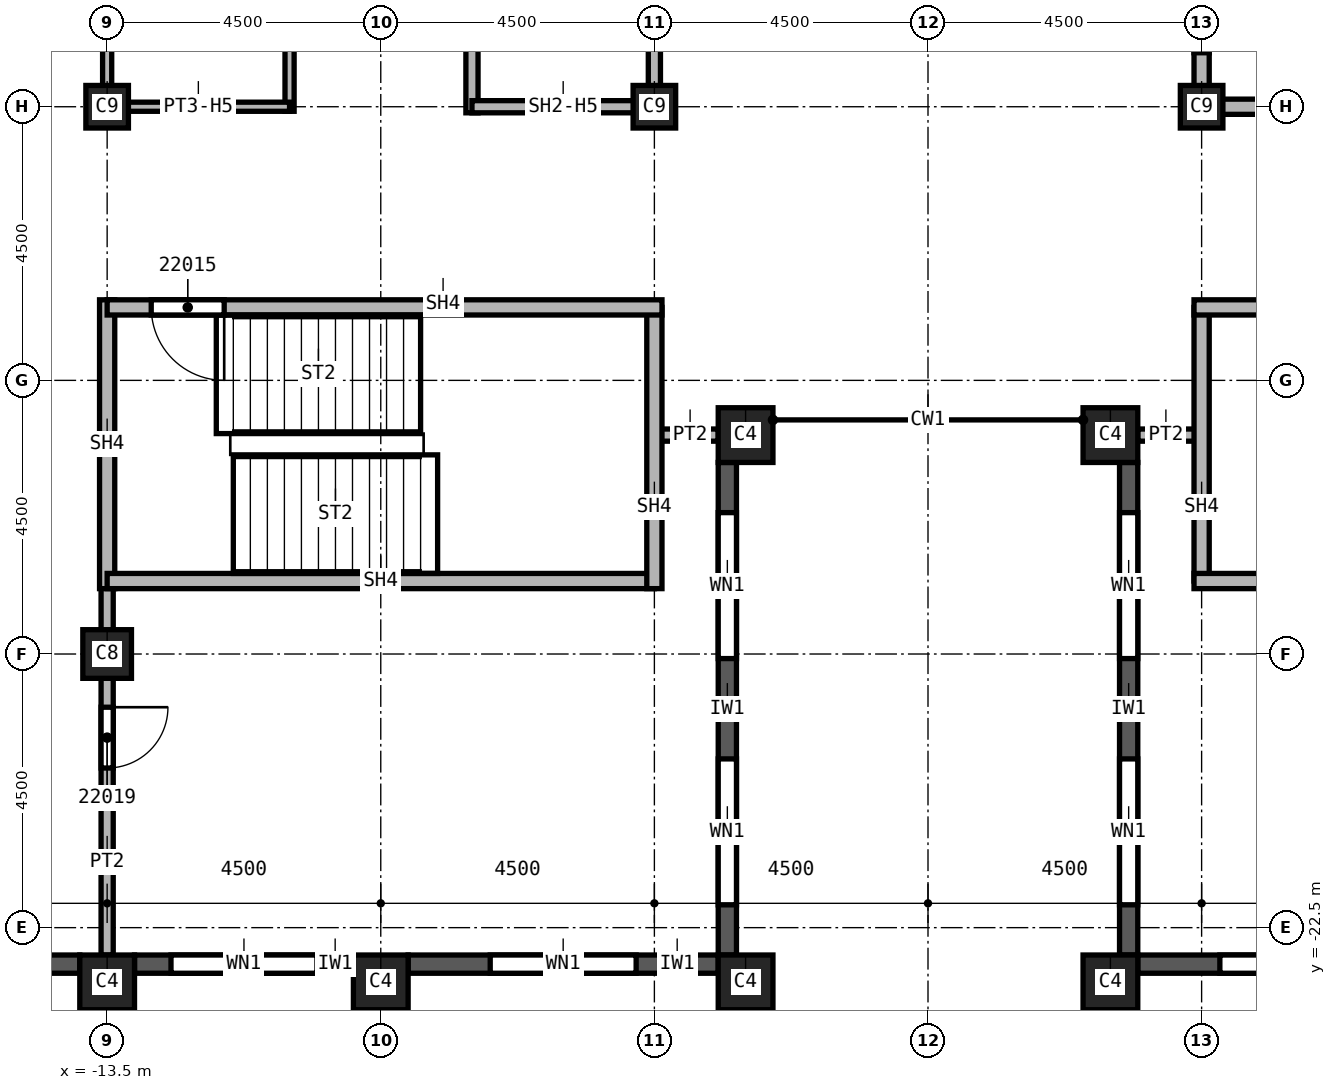
"""IFC4 building model, lengths in metres.
Left out: names, types, materials, properties, quantities, classifications, styles, units other than length and angle.
Written with IfcOpenShell. Run it as: python <this file> out.ifc"""

import sys

from ifc_helpers import new_model, si_unit, direction, frame, frame_2d, origin, origin_2d, place, context, subcontext, project, spatial, rectangle, extrude, element, fill, save


model = new_model("IFC4")
c1 = context("Model", 3, precision=1e-05, world=origin(), true_north=direction((0.0, 1.0)))
c2 = subcontext(c1, "Body", "Model", "MODEL_VIEW")
j1 = project(units=[si_unit("LENGTHUNIT", "METRE"), si_unit("PLANEANGLEUNIT", "RADIAN")], contexts=[c1])
p1 = place(None, origin())
s1 = spatial("IfcSite", under=j1, at=p1, CompositionType="ELEMENT")
p2 = place(p1, origin())
s2 = spatial("IfcBuilding", under=s1, at=p2, CompositionType="ELEMENT")
p3 = place(p2, frame((0.0, 0.0, 316.0)))
s3 = spatial("IfcBuildingStorey", under=s2, at=p3, CompositionType="ELEMENT", Elevation=316.0)
p4 = place(p3, frame((-13.5, -18.0, 0.0), z_axis=(0.0, 0.0, 1.0), x_axis=(1.0, 0.0, 0.0)))
e1 = element("IfcColumn", 1, at=p4, inside=s3, PredefinedType="COLUMN", context=c2, shape_type="SweptSolid", body=[
    extrude(rectangle(XDim=0.8, YDim=0.8, at=origin_2d()), origin(), (0.0, 0.0, 1.0), 3.59),
])
for number, where, z_axis, x_axis in (
    (2, (4.5, -9.0, 0.0), (0.0, 0.0, 1.0), (1.0, 0.0, 0.0)),
    (3, (-4.5, -9.0, 0.0), (0.0, 0.0, 1.0), (1.0, 0.0, 0.0)),
    (4, (-13.5, -9.0, 0.0), (0.0, 0.0, 1.0), (1.0, 0.0, 0.0)),
):
    element("IfcColumn", number, at=place(p3, frame(where, z_axis=z_axis, x_axis=x_axis)), inside=s3, PredefinedType="COLUMN", context=c2, shape_type="SweptSolid", body=[
        extrude(rectangle(XDim=0.7, YDim=0.7, at=origin_2d()), origin(), (0.0, 0.0, 1.0), 3.59),
    ])
for number, where, z_axis, x_axis in (
    (5, (3.0, -23.4, 0.0), (0.0, 0.0, 1.0), (1.0, 0.0, 0.0)),
    (6, (-3.0, -23.4, 0.0), (0.0, 0.0, 1.0), (1.0, 0.0, 0.0)),
    (7, (-9.0, -23.4, 0.0), (0.0, 0.0, 1.0), (1.0, 0.0, 0.0)),
    (8, (-13.5, -23.4, 0.0), (0.0, 0.0, 1.0), (1.0, 0.0, 0.0)),
    (9, (3.0, -14.4, 0.0), (0.0, 0.0, 1.0), (1.0, 0.0, 0.0)),
    (10, (-3.0, -14.4, 0.0), (0.0, 0.0, 1.0), (1.0, 0.0, 0.0)),
):
    element("IfcColumn", number, at=place(p3, frame(where, z_axis=z_axis, x_axis=x_axis)), inside=s3, PredefinedType="COLUMN", context=c2, shape_type="SweptSolid", body=[
        extrude(rectangle(XDim=0.9, YDim=0.9, at=origin_2d()), origin(), (0.0, 0.0, 1.0), 3.59),
    ])
p5 = place(p3, frame((-17.55, -23.1, 0.0), z_axis=(0.0, 0.0, 1.0), x_axis=(1.0, 0.0, 0.0)))
e11 = element("IfcWall", 11, at=p5, inside=s3, PredefinedType="SOLIDWALL", context=c2, shape_type="SweptSolid", body=[
    extrude(rectangle(XDim=3.6, YDim=0.3, at=frame_2d((1.8, 0.0))), origin(), (0.0, 0.0, 1.0), 2.99),
])
p6 = place(p5, frame((0.775, 0.0, 0.8)))
e12 = element("IfcOpeningElement", 12, at=p6, cuts=e11, PredefinedType="OPENING", context=c2, shape_type="SweptSolid", body=[
    extrude(rectangle(XDim=1.0, YDim=1.95, at=frame_2d((0.5, 0.975))), frame((0.0, 0.15, 0.0), z_axis=(0.0, -1.0, 0.0), x_axis=(1.0, 0.0, 0.0)), (0.0, 0.0, 1.0), 0.3),
])
p7 = place(p5, frame((2.375, 0.0, 0.8)))
e13 = element("IfcOpeningElement", 13, at=p7, cuts=e11, PredefinedType="OPENING", context=c2, shape_type="SweptSolid", body=[
    extrude(rectangle(XDim=0.6, YDim=1.95, at=frame_2d((0.3, 0.975))), frame((0.0, 0.15, 0.0), z_axis=(0.0, -1.0, 0.0), x_axis=(1.0, 0.0, 0.0)), (0.0, 0.0, 1.0), 0.3),
])
p8 = place(p3, frame((-13.05, -23.1, 0.0), z_axis=(0.0, 0.0, 1.0), x_axis=(1.0, 0.0, 0.0)))
e14 = element("IfcWall", 14, at=p8, inside=s3, PredefinedType="SOLIDWALL", context=c2, shape_type="SweptSolid", body=[
    extrude(rectangle(XDim=3.6, YDim=0.3, at=frame_2d((1.8, 0.0))), origin(), (0.0, 0.0, 1.0), 2.99),
])
p9 = place(p8, frame((0.6, 0.0, 0.8)))
e15 = element("IfcOpeningElement", 15, at=p9, cuts=e14, PredefinedType="OPENING", context=c2, shape_type="SweptSolid", body=[
    extrude(rectangle(XDim=2.4, YDim=1.95, at=frame_2d((1.2, 0.975))), frame((0.0, 0.15, 0.0), z_axis=(0.0, -1.0, 0.0), x_axis=(1.0, 0.0, 0.0)), (0.0, 0.0, 1.0), 0.3),
])
p10 = place(p3, frame((-8.55, -23.1, 0.0), z_axis=(0.0, 0.0, 1.0), x_axis=(1.0, 0.0, 0.0)))
e16 = element("IfcWall", 16, at=p10, inside=s3, PredefinedType="SOLIDWALL", context=c2, shape_type="SweptSolid", body=[
    extrude(rectangle(XDim=5.1, YDim=0.3, at=frame_2d((2.55, 0.0))), origin(), (0.0, 0.0, 1.0), 2.99),
])
p11 = place(p10, frame((1.35, 0.0, 0.8)))
e17 = element("IfcOpeningElement", 17, at=p11, cuts=e16, PredefinedType="OPENING", context=c2, shape_type="SweptSolid", body=[
    extrude(rectangle(XDim=2.4, YDim=1.95, at=frame_2d((1.2, 0.975))), frame((0.0, 0.15, 0.0), z_axis=(0.0, -1.0, 0.0), x_axis=(1.0, 0.0, 0.0)), (0.0, 0.0, 1.0), 0.3),
])
p12 = place(p3, frame((-3.3, -22.95, 0.0), z_axis=(0.0, 0.0, 1.0), x_axis=(0.0, 1.0, 0.0)))
e18 = element("IfcWall", 18, at=p12, inside=s3, PredefinedType="SOLIDWALL", context=c2, shape_type="SweptSolid", body=[
    extrude(rectangle(XDim=8.1, YDim=0.3, at=frame_2d((4.05, 0.0))), origin(), (0.0, 0.0, 1.0), 2.99),
])
p13 = place(p12, frame((0.825, 0.0, 0.8)))
e19 = element("IfcOpeningElement", 19, at=p13, cuts=e18, PredefinedType="OPENING", context=c2, shape_type="SweptSolid", body=[
    extrude(rectangle(XDim=2.4, YDim=1.95, at=frame_2d((1.2, 0.975))), frame((0.0, 0.15, 0.0), z_axis=(0.0, -1.0, 0.0), x_axis=(1.0, 0.0, 0.0)), (0.0, 0.0, 1.0), 0.3),
])
p14 = place(p12, frame((4.875, 0.0, 0.8)))
e20 = element("IfcOpeningElement", 20, at=p14, cuts=e18, PredefinedType="OPENING", context=c2, shape_type="SweptSolid", body=[
    extrude(rectangle(XDim=2.4, YDim=1.95, at=frame_2d((1.2, 0.975))), frame((0.0, 0.15, 0.0), z_axis=(0.0, -1.0, 0.0), x_axis=(1.0, 0.0, 0.0)), (0.0, 0.0, 1.0), 0.3),
])
p15 = place(p3, frame((3.3, -14.85, 0.0), z_axis=(0.0, 0.0, 1.0), x_axis=(0.0, -1.0, 0.0)))
e21 = element("IfcWall", 21, at=p15, inside=s3, PredefinedType="SOLIDWALL", context=c2, shape_type="SweptSolid", body=[
    extrude(rectangle(XDim=8.1, YDim=0.3, at=frame_2d((4.05, 0.0))), origin(), (0.0, 0.0, 1.0), 2.99),
])
p16 = place(p15, frame((0.825, 0.0, 0.8)))
e22 = element("IfcOpeningElement", 22, at=p16, cuts=e21, PredefinedType="OPENING", context=c2, shape_type="SweptSolid", body=[
    extrude(rectangle(XDim=2.4, YDim=1.95, at=frame_2d((1.2, 0.975))), frame((0.0, 0.15, 0.0), z_axis=(0.0, -1.0, 0.0), x_axis=(1.0, 0.0, 0.0)), (0.0, 0.0, 1.0), 0.3),
])
p17 = place(p15, frame((4.875, 0.0, 0.8)))
e23 = element("IfcOpeningElement", 23, at=p17, cuts=e21, PredefinedType="OPENING", context=c2, shape_type="SweptSolid", body=[
    extrude(rectangle(XDim=2.4, YDim=1.95, at=frame_2d((1.2, 0.975))), frame((0.0, 0.15, 0.0), z_axis=(0.0, -1.0, 0.0), x_axis=(1.0, 0.0, 0.0)), (0.0, 0.0, 1.0), 0.3),
])
p18 = place(p3, frame((3.45, -23.1, 0.0), z_axis=(0.0, 0.0, 1.0), x_axis=(1.0, 0.0, 0.0)))
e24 = element("IfcWall", 24, at=p18, inside=s3, PredefinedType="SOLIDWALL", context=c2, shape_type="SweptSolid", body=[
    extrude(rectangle(XDim=5.1, YDim=0.3, at=frame_2d((2.55, 0.0))), origin(), (0.0, 0.0, 1.0), 2.99),
])
p19 = place(p18, frame((1.35, 0.0, 0.8)))
e25 = element("IfcOpeningElement", 25, at=p19, cuts=e24, PredefinedType="OPENING", context=c2, shape_type="SweptSolid", body=[
    extrude(rectangle(XDim=2.4, YDim=1.95, at=frame_2d((1.2, 0.975))), frame((0.0, 0.15, 0.0), z_axis=(0.0, -1.0, 0.0), x_axis=(1.0, 0.0, 0.0)), (0.0, 0.0, 1.0), 0.3),
])
p20 = place(p3, frame((-13.5, -16.675, 0.0), z_axis=(0.0, 0.0, 1.0), x_axis=(0.0, -1.0, 0.0)))
e26 = element("IfcWall", 26, at=p20, inside=s3, PredefinedType="PARTITIONING", context=c2, shape_type="SweptSolid", body=[
    extrude(rectangle(XDim=6.275, YDim=0.2, at=frame_2d((3.137, 0.0))), origin(), (0.0, 0.0, 1.0), 3.59),
])
p21 = place(p20, frame((2.2, 0.0, 0.0)))
e27 = element("IfcOpeningElement", 27, at=p21, cuts=e26, PredefinedType="OPENING", context=c2, shape_type="SweptSolid", body=[
    extrude(rectangle(XDim=1.0, YDim=2.1, at=frame_2d((0.5, 1.05))), frame((0.0, 0.1, 0.0), z_axis=(0.0, -1.0, 0.0), x_axis=(1.0, 0.0, 0.0)), (0.0, 0.0, 1.0), 0.2),
])
for number, where, z_axis, x_axis in (
    (28, (-3.45, -14.4, 0.0), (0.0, 0.0, 1.0), (-1.0, 0.0, 0.0)),
    (29, (4.5, -14.4, 0.0), (0.0, 0.0, 1.0), (-1.0, 0.0, 0.0)),
):
    element("IfcWall", number, at=place(p3, frame(where, z_axis=z_axis, x_axis=x_axis)), inside=s3, PredefinedType="PARTITIONING", context=c2, shape_type="SweptSolid", body=[
        extrude(rectangle(XDim=1.05, YDim=0.2, at=frame_2d((0.525, 0.0))), origin(), (0.0, 0.0, 1.0), 3.59),
    ])
p22 = place(p3, frame((-7.5, -9.1, 0.0), z_axis=(0.0, 0.0, 1.0), x_axis=(0.0, 1.0, 0.0)))
e30 = element("IfcWall", 30, at=p22, inside=s3, PredefinedType="SOLIDWALL", context=c2, shape_type="SweptSolid", body=[
    extrude(rectangle(XDim=6.225, YDim=0.2, at=frame_2d((3.113, 0.0))), origin(), (0.0, 0.0, 1.0), 3.59),
])
p23 = place(p3, frame((-4.5, -9.0, 0.0), z_axis=(0.0, 0.0, 1.0), x_axis=(-1.0, 0.0, 0.0)))
e31 = element("IfcWall", 31, at=p23, inside=s3, PredefinedType="SOLIDWALL", context=c2, shape_type="SweptSolid", body=[
    extrude(rectangle(XDim=3.0, YDim=0.2, at=frame_2d((1.5, 0.0))), origin(), (0.0, 0.0, 1.0), 2.828),
])
p24 = place(p3, frame((-4.5, 6.0, 0.0), z_axis=(0.0, 0.0, 1.0), x_axis=(0.0, -1.0, 0.0)))
e32 = element("IfcWall", 32, at=p24, inside=s3, PredefinedType="SOLIDWALL", context=c2, shape_type="SweptSolid", body=[
    extrude(rectangle(XDim=15.1, YDim=0.2, at=frame_2d((7.55, 0.0))), origin(), (0.0, 0.0, 1.0), 2.828),
])
p25 = place(p24, frame((7.3, 0.0, 0.0)))
e33 = element("IfcOpeningElement", 33, at=p25, cuts=e32, PredefinedType="OPENING", context=c2, shape_type="SweptSolid", body=[
    extrude(rectangle(XDim=1.1, YDim=2.1, at=frame_2d((0.55, 1.05))), frame((0.0, 0.1, 0.0), z_axis=(0.0, -1.0, 0.0), x_axis=(1.0, 0.0, 0.0)), (0.0, 0.0, 1.0), 0.2),
])
p26 = place(p24, frame((4.0, 0.0, 0.0)))
e34 = element("IfcOpeningElement", 34, at=p26, cuts=e32, PredefinedType="OPENING", context=c2, shape_type="SweptSolid", body=[
    extrude(rectangle(XDim=1.1, YDim=2.1, at=frame_2d((0.55, 1.05))), frame((0.0, 0.1, 0.0), z_axis=(0.0, -1.0, 0.0), x_axis=(1.0, 0.0, 0.0)), (0.0, 0.0, 1.0), 0.2),
])
p27 = place(p3, frame((4.5, -9.125, 0.0), z_axis=(0.0, 0.0, 1.0), x_axis=(0.0, 1.0, 0.0)))
e35 = element("IfcWall", 35, at=p27, inside=s3, PredefinedType="SOLIDWALL", context=c2, shape_type="SweptSolid", body=[
    extrude(rectangle(XDim=3.125, YDim=0.25, at=frame_2d((1.562, 0.0))), origin(), (0.0, 0.0, 1.0), 2.828),
])
p28 = place(p27, frame((1.012, 0.0, 0.0)))
e36 = element("IfcOpeningElement", 36, at=p28, cuts=e35, PredefinedType="OPENING", context=c2, shape_type="SweptSolid", body=[
    extrude(rectangle(XDim=1.1, YDim=2.1, at=frame_2d((0.55, 1.05))), frame((0.0, 0.125, 0.0), z_axis=(0.0, -1.0, 0.0), x_axis=(1.0, 0.0, 0.0)), (0.0, 0.0, 1.0), 0.25),
])
p29 = place(p3, frame((7.5, -9.0, 0.0), z_axis=(0.0, 0.0, 1.0), x_axis=(-1.0, 0.0, 0.0)))
e37 = element("IfcWall", 37, at=p29, inside=s3, PredefinedType="SOLIDWALL", context=c2, shape_type="SweptSolid", body=[
    extrude(rectangle(XDim=3.0, YDim=0.25, at=frame_2d((1.5, 0.0))), origin(), (0.0, 0.0, 1.0), 2.828),
])
p30 = place(p3, frame((-13.5, -12.175, 0.0), z_axis=(0.0, 0.0, 1.0), x_axis=(0.0, -1.0, 0.0)))
e38 = element("IfcWall", 38, at=p30, inside=s3, PredefinedType="SOLIDWALL", context=c2, shape_type="SweptSolid", body=[
    extrude(rectangle(XDim=4.75, YDim=0.25, at=frame_2d((2.375, 0.0))), origin(), (0.0, 0.0, 1.0), 3.59),
])
p31 = place(p3, frame((-4.5, -16.8, 0.0), z_axis=(0.0, 0.0, 1.0), x_axis=(-1.0, 0.0, 0.0)))
e39 = element("IfcWall", 39, at=p31, inside=s3, PredefinedType="SOLIDWALL", context=c2, shape_type="SweptSolid", body=[
    extrude(rectangle(XDim=9.0, YDim=0.25, at=frame_2d((4.5, 0.0))), origin(), (0.0, 0.0, 1.0), 3.59),
])
p32 = place(p3, frame((-4.5, -12.3, 0.0), z_axis=(0.0, 0.0, 1.0), x_axis=(0.0, -1.0, 0.0)))
e40 = element("IfcWall", 40, at=p32, inside=s3, PredefinedType="SOLIDWALL", context=c2, shape_type="SweptSolid", body=[
    extrude(rectangle(XDim=4.625, YDim=0.25, at=frame_2d((2.312, 0.0))), origin(), (0.0, 0.0, 1.0), 3.59),
])
p33 = place(p3, frame((-4.375, -12.3, 0.0), z_axis=(0.0, 0.0, 1.0), x_axis=(-1.0, 0.0, 0.0)))
e41 = element("IfcWall", 41, at=p33, inside=s3, PredefinedType="SOLIDWALL", context=c2, shape_type="SweptSolid", body=[
    extrude(rectangle(XDim=9.125, YDim=0.25, at=frame_2d((4.562, 0.0))), origin(), (0.0, 0.0, 1.0), 3.59),
])
p34 = place(p33, frame((7.2, 0.0, 0.0)))
e42 = element("IfcOpeningElement", 42, at=p34, cuts=e41, PredefinedType="OPENING", context=c2, shape_type="SweptSolid", body=[
    extrude(rectangle(XDim=1.2, YDim=2.1, at=frame_2d((0.6, 1.05))), frame((0.0, 0.125, 0.0), z_axis=(0.0, -1.0, 0.0), x_axis=(1.0, 0.0, 0.0)), (0.0, 0.0, 1.0), 0.25),
])
p35 = place(p3, frame((4.5, -16.8, 0.0), z_axis=(0.0, 0.0, 1.0), x_axis=(0.0, 1.0, 0.0)))
e43 = element("IfcWall", 43, at=p35, inside=s3, PredefinedType="SOLIDWALL", context=c2, shape_type="SweptSolid", body=[
    extrude(rectangle(XDim=4.5, YDim=0.25, at=frame_2d((2.25, 0.0))), origin(), (0.0, 0.0, 1.0), 3.59),
])
p36 = place(p3, frame((13.5, -16.8, 0.0), z_axis=(0.0, 0.0, 1.0), x_axis=(-1.0, 0.0, 0.0)))
e44 = element("IfcWall", 44, at=p36, inside=s3, PredefinedType="SOLIDWALL", context=c2, shape_type="SweptSolid", body=[
    extrude(rectangle(XDim=9.125, YDim=0.25, at=frame_2d((4.562, 0.0))), origin(), (0.0, 0.0, 1.0), 3.59),
])
p37 = place(p3, frame((13.5, -12.3, 0.0), z_axis=(0.0, 0.0, 1.0), x_axis=(-1.0, 0.0, 0.0)))
e45 = element("IfcWall", 45, at=p37, inside=s3, PredefinedType="SOLIDWALL", context=c2, shape_type="SweptSolid", body=[
    extrude(rectangle(XDim=9.125, YDim=0.25, at=frame_2d((4.562, 0.0))), origin(), (0.0, 0.0, 1.0), 3.59),
])
p38 = place(p37, frame((0.6, 0.0, 0.0)))
e46 = element("IfcOpeningElement", 46, at=p38, cuts=e45, PredefinedType="OPENING", context=c2, shape_type="SweptSolid", body=[
    extrude(rectangle(XDim=1.2, YDim=2.1, at=frame_2d((0.6, 1.05))), frame((0.0, 0.125, 0.0), z_axis=(0.0, -1.0, 0.0), x_axis=(1.0, 0.0, 0.0)), (0.0, 0.0, 1.0), 0.25),
])
p39 = place(p3, frame((-13.5, -9.075, 0.0), z_axis=(0.0, 0.0, 1.0), x_axis=(0.0, 1.0, 0.0)))
e47 = element("IfcWall", 47, at=p39, inside=s3, PredefinedType="PARTITIONING", context=c2, shape_type="SweptSolid", body=[
    extrude(rectangle(XDim=4.075, YDim=0.15, at=frame_2d((2.038, 0.0))), origin(), (0.0, 0.0, 1.0), 2.828),
])
p40 = place(p3, frame((-10.5, -9.075, 0.0), z_axis=(0.0, 0.0, 1.0), x_axis=(0.0, 1.0, 0.0)))
e48 = element("IfcWall", 48, at=p40, inside=s3, PredefinedType="PARTITIONING", context=c2, shape_type="SweptSolid", body=[
    extrude(rectangle(XDim=4.15, YDim=0.15, at=frame_2d((2.075, 0.0))), origin(), (0.0, 0.0, 1.0), 3.59),
])
p41 = place(p40, frame((2.95, 0.0, 0.0)))
e49 = element("IfcOpeningElement", 49, at=p41, cuts=e48, PredefinedType="OPENING", context=c2, shape_type="SweptSolid", body=[
    extrude(rectangle(XDim=0.9, YDim=2.1, at=frame_2d((0.45, 1.05))), frame((0.0, 0.075, 0.0), z_axis=(0.0, -1.0, 0.0), x_axis=(1.0, 0.0, 0.0)), (0.0, 0.0, 1.0), 0.15),
])
p42 = place(p3, frame((-10.5, -9.0, 0.0), z_axis=(0.0, 0.0, 1.0), x_axis=(-1.0, 0.0, 0.0)))
e50 = element("IfcWall", 50, at=p42, inside=s3, PredefinedType="PARTITIONING", context=c2, shape_type="SweptSolid", body=[
    extrude(rectangle(XDim=3.0, YDim=0.15, at=frame_2d((1.5, 0.0))), origin(), (0.0, 0.0, 1.0), 2.828),
])
p43 = place(p9, origin())
e51 = element("IfcWindow", 51, at=p43, inside=s3, PartitioningType="SINGLE_PANEL", PredefinedType="WINDOW", context=c2, shape_type="SweptSolid", body=[
    extrude(rectangle(XDim=2.4, YDim=1.95, at=frame_2d((1.2, 0.975))), frame((0.0, 0.03, 0.0), z_axis=(0.0, -1.0, 0.0), x_axis=(1.0, 0.0, 0.0)), (0.0, 0.0, 1.0), 0.06),
])
fill(e15, e51)
p44 = place(p11, origin())
e52 = element("IfcWindow", 52, at=p44, inside=s3, PartitioningType="SINGLE_PANEL", PredefinedType="WINDOW", context=c2, shape_type="SweptSolid", body=[
    extrude(rectangle(XDim=2.4, YDim=1.95, at=frame_2d((1.2, 0.975))), frame((0.0, 0.03, 0.0), z_axis=(0.0, -1.0, 0.0), x_axis=(1.0, 0.0, 0.0)), (0.0, 0.0, 1.0), 0.06),
])
fill(e17, e52)
p45 = place(p13, origin())
e53 = element("IfcWindow", 53, at=p45, inside=s3, PartitioningType="SINGLE_PANEL", PredefinedType="WINDOW", context=c2, shape_type="SweptSolid", body=[
    extrude(rectangle(XDim=2.4, YDim=1.95, at=frame_2d((1.2, 0.975))), frame((0.0, 0.03, 0.0), z_axis=(0.0, -1.0, 0.0), x_axis=(1.0, 0.0, 0.0)), (0.0, 0.0, 1.0), 0.06),
])
fill(e19, e53)
p46 = place(p14, origin())
e54 = element("IfcWindow", 54, at=p46, inside=s3, PartitioningType="SINGLE_PANEL", PredefinedType="WINDOW", context=c2, shape_type="SweptSolid", body=[
    extrude(rectangle(XDim=2.4, YDim=1.95, at=frame_2d((1.2, 0.975))), frame((0.0, 0.03, 0.0), z_axis=(0.0, -1.0, 0.0), x_axis=(1.0, 0.0, 0.0)), (0.0, 0.0, 1.0), 0.06),
])
fill(e20, e54)
p47 = place(p16, origin())
e55 = element("IfcWindow", 55, at=p47, inside=s3, PartitioningType="SINGLE_PANEL", PredefinedType="WINDOW", context=c2, shape_type="SweptSolid", body=[
    extrude(rectangle(XDim=2.4, YDim=1.95, at=frame_2d((1.2, 0.975))), frame((0.0, 0.03, 0.0), z_axis=(0.0, -1.0, 0.0), x_axis=(1.0, 0.0, 0.0)), (0.0, 0.0, 1.0), 0.06),
])
fill(e22, e55)
p48 = place(p17, origin())
e56 = element("IfcWindow", 56, at=p48, inside=s3, PartitioningType="SINGLE_PANEL", PredefinedType="WINDOW", context=c2, shape_type="SweptSolid", body=[
    extrude(rectangle(XDim=2.4, YDim=1.95, at=frame_2d((1.2, 0.975))), frame((0.0, 0.03, 0.0), z_axis=(0.0, -1.0, 0.0), x_axis=(1.0, 0.0, 0.0)), (0.0, 0.0, 1.0), 0.06),
])
fill(e23, e56)
p49 = place(p19, origin())
e57 = element("IfcWindow", 57, at=p49, inside=s3, PartitioningType="SINGLE_PANEL", PredefinedType="WINDOW", context=c2, shape_type="SweptSolid", body=[
    extrude(rectangle(XDim=2.4, YDim=1.95, at=frame_2d((1.2, 0.975))), frame((0.0, 0.03, 0.0), z_axis=(0.0, -1.0, 0.0), x_axis=(1.0, 0.0, 0.0)), (0.0, 0.0, 1.0), 0.06),
])
fill(e25, e57)
p50 = place(p34, origin())
e58 = element("IfcDoor", 58, at=p50, inside=s3, OperationType="SINGLE_SWING_RIGHT", PredefinedType="DOOR", context=c2, shape_type="SweptSolid", body=[
    extrude(rectangle(XDim=1.2, YDim=2.1, at=frame_2d((0.6, 1.05))), frame((0.0, 0.025, 0.0), z_axis=(0.0, -1.0, 0.0), x_axis=(1.0, 0.0, 0.0)), (0.0, 0.0, 1.0), 0.05),
])
fill(e42, e58)
p51 = place(p21, origin())
e59 = element("IfcDoor", 59, at=p51, inside=s3, OperationType="SINGLE_SWING_RIGHT", PredefinedType="DOOR", context=c2, shape_type="SweptSolid", body=[
    extrude(rectangle(XDim=1.0, YDim=2.1, at=frame_2d((0.5, 1.05))), frame((0.0, 0.025, 0.0), z_axis=(0.0, -1.0, 0.0), x_axis=(1.0, 0.0, 0.0)), (0.0, 0.0, 1.0), 0.05),
])
fill(e27, e59)
p52 = place(p28, origin())
e60 = element("IfcDoor", 60, at=p52, inside=s3, OperationType="SLIDING_TO_LEFT", PredefinedType="DOOR", context=c2, shape_type="SweptSolid", body=[
    extrude(rectangle(XDim=1.1, YDim=2.1, at=frame_2d((0.55, 1.05))), frame((0.0, 0.025, 0.0), z_axis=(0.0, -1.0, 0.0), x_axis=(1.0, 0.0, 0.0)), (0.0, 0.0, 1.0), 0.05),
])
fill(e36, e60)
save(model, sys.argv[1])
